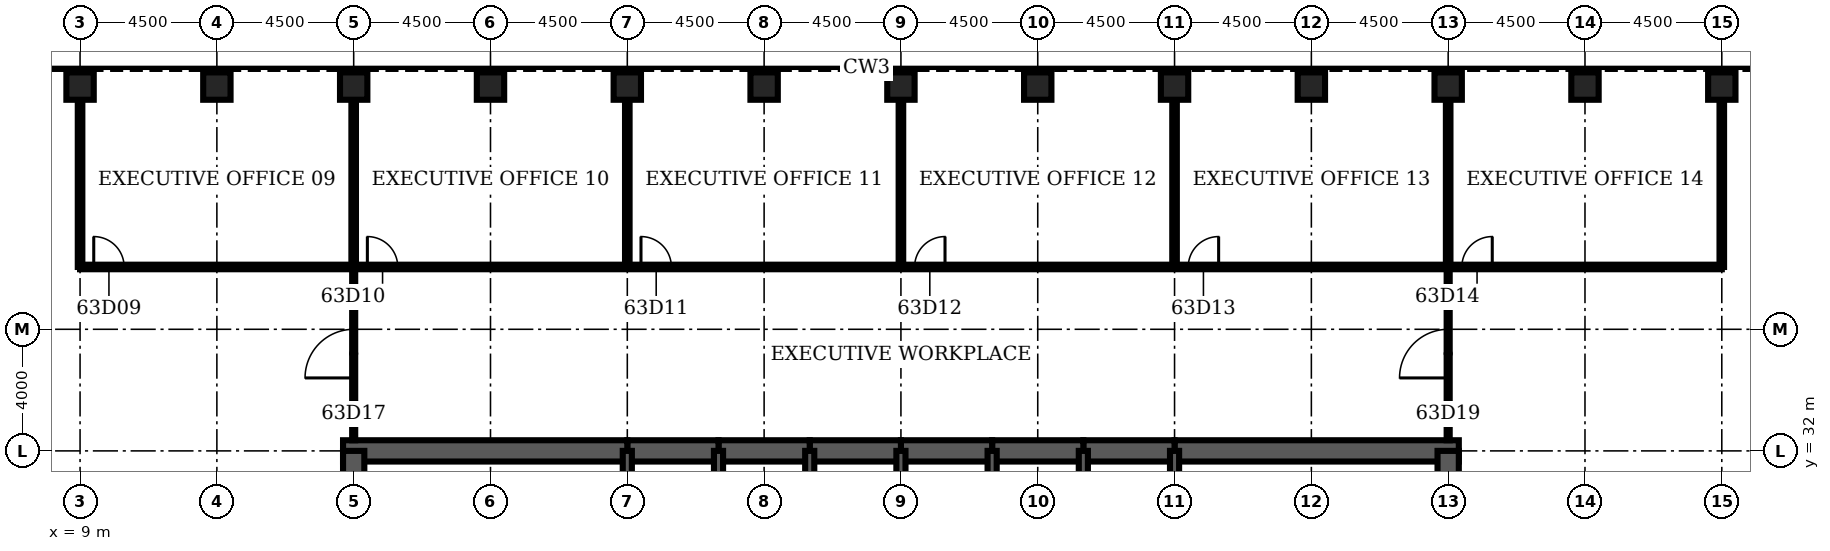
"""IFC4 building model, lengths in metres.
Left out: names, types, materials, properties, quantities, classifications, styles, units other than length and angle.
Written with IfcOpenShell. Run it as: python <this file> out.ifc"""

import sys

from ifc_helpers import new_model, si_unit, direction, frame, frame_2d, origin, origin_2d, place, context, subcontext, project, spatial, rectangle, hollow_rectangle, extrude, element, fill, save


model = new_model("IFC4")
c1 = context("Model", 3, precision=1e-05, world=origin(), true_north=direction((0.0, 1.0)))
c2 = subcontext(c1, "Body", "Model", "MODEL_VIEW")
j1 = project(units=[si_unit("LENGTHUNIT", "METRE"), si_unit("PLANEANGLEUNIT", "RADIAN")], contexts=[c1])
p1 = place(None, origin())
s1 = spatial("IfcSite", under=j1, at=p1, CompositionType="ELEMENT")
p2 = place(p1, origin())
s2 = spatial("IfcBuilding", under=s1, at=p2, CompositionType="ELEMENT")
p3 = place(p2, frame((0.0, 0.0, 279.5)))
s3 = spatial("IfcBuildingStorey", under=s2, at=p3, CompositionType="ELEMENT", Elevation=279.5)
for number, where, z_axis, x_axis in (
    (1, (63.0, 44.0, 0.0), (0.0, 0.0, 1.0), (0.0, 1.0, 0.0)),
    (2, (58.5, 44.0, 0.0), (0.0, 0.0, 1.0), (0.0, 1.0, 0.0)),
    (3, (54.0, 44.0, 0.0), (0.0, 0.0, 1.0), (0.0, 1.0, 0.0)),
    (4, (49.5, 44.0, 0.0), (0.0, 0.0, 1.0), (0.0, 1.0, 0.0)),
    (5, (45.0, 44.0, 0.0), (0.0, 0.0, 1.0), (0.0, 1.0, 0.0)),
    (6, (40.5, 44.0, 0.0), (0.0, 0.0, 1.0), (0.0, 1.0, 0.0)),
    (7, (36.0, 44.0, 0.0), (0.0, 0.0, 1.0), (0.0, 1.0, 0.0)),
    (8, (31.5, 44.0, 0.0), (0.0, 0.0, 1.0), (0.0, 1.0, 0.0)),
    (9, (27.0, 44.0, 0.0), (0.0, 0.0, 1.0), (0.0, 1.0, 0.0)),
    (10, (22.5, 44.0, 0.0), (0.0, 0.0, 1.0), (0.0, 1.0, 0.0)),
    (11, (18.0, 44.0, 0.0), (0.0, 0.0, 1.0), (0.0, 1.0, 0.0)),
    (12, (13.5, 44.0, 0.0), (0.0, 0.0, 1.0), (0.0, 1.0, 0.0)),
    (13, (9.0, 44.0, 0.0), (0.0, 0.0, 1.0), (0.0, 1.0, 0.0)),
):
    element("IfcColumn", number, at=place(p3, frame(where, z_axis=z_axis, x_axis=x_axis)), inside=s3, PredefinedType="COLUMN", context=c2, shape_type="SweptSolid", body=[
        extrude(hollow_rectangle(XDim=0.9, YDim=0.9, WallThickness=0.07, at=origin_2d()), origin(), (0.0, 0.0, 1.0), 4.2),
    ])
p4 = place(p3, frame((54.35, 32.0, 0.0), z_axis=(0.0, 0.0, 1.0), x_axis=(-1.0, 0.0, 0.0)))
e14 = element("IfcWall", 14, at=p4, inside=s3, PredefinedType="SHEAR", context=c2, shape_type="SweptSolid", body=[
    extrude(rectangle(XDim=9.35, YDim=0.7, at=frame_2d((4.675, 0.0))), origin(), (0.0, 0.0, 1.0), 4.2),
])
for number, where, z_axis, x_axis in (
    (15, (45.0, 32.0, 0.0), (0.0, 0.0, 1.0), (-1.0, 0.0, 0.0)),
    (16, (42.0, 32.0, 0.0), (0.0, 0.0, 1.0), (-1.0, 0.0, 0.0)),
    (17, (39.0, 32.0, 0.0), (0.0, 0.0, 1.0), (-1.0, 0.0, 0.0)),
    (18, (36.0, 32.0, 0.0), (0.0, 0.0, 1.0), (-1.0, 0.0, 0.0)),
    (19, (33.0, 32.0, 0.0), (0.0, 0.0, 1.0), (-1.0, 0.0, 0.0)),
    (20, (30.0, 32.0, 0.0), (0.0, 0.0, 1.0), (-1.0, 0.0, 0.0)),
):
    element("IfcWall", number, at=place(p3, frame(where, z_axis=z_axis, x_axis=x_axis)), inside=s3, PredefinedType="SHEAR", context=c2, shape_type="SweptSolid", body=[
        extrude(rectangle(XDim=3.0, YDim=0.7, at=frame_2d((1.5, 0.0))), origin(), (0.0, 0.0, 1.0), 4.2),
    ])
p5 = place(p3, frame((27.0, 32.0, 0.0), z_axis=(0.0, 0.0, 1.0), x_axis=(-1.0, 0.0, 0.0)))
e21 = element("IfcWall", 21, at=p5, inside=s3, PredefinedType="SHEAR", context=c2, shape_type="SweptSolid", body=[
    extrude(rectangle(XDim=9.35, YDim=0.7, at=frame_2d((4.675, 0.0))), origin(), (0.0, 0.0, 1.0), 4.2),
])
for number, where, z_axis, x_axis in (
    (22, (18.0, 32.0, 0.0), (0.0, 0.0, 1.0), (0.0, -1.0, 0.0)),
    (23, (54.0, 28.8, 0.0), (0.0, 0.0, 1.0), (0.0, 1.0, 0.0)),
):
    element("IfcWall", number, at=place(p3, frame(where, z_axis=z_axis, x_axis=x_axis)), inside=s3, PredefinedType="SHEAR", context=c2, shape_type="SweptSolid", body=[
        extrude(rectangle(XDim=3.2, YDim=0.7, at=frame_2d((1.6, 0.0))), origin(), (0.0, 0.0, 1.0), 4.2),
    ])
for number, where, z_axis, x_axis in (
    (24, (27.0, 28.8, 0.0), (0.0, 0.0, 1.0), (0.0, 1.0, 0.0)),
    (25, (30.0, 28.8, 0.0), (0.0, 0.0, 1.0), (0.0, 1.0, 0.0)),
    (26, (33.0, 28.8, 0.0), (0.0, 0.0, 1.0), (0.0, 1.0, 0.0)),
    (27, (36.0, 28.8, 0.0), (0.0, 0.0, 1.0), (0.0, 1.0, 0.0)),
    (28, (39.0, 28.8, 0.0), (0.0, 0.0, 1.0), (0.0, 1.0, 0.0)),
    (29, (42.0, 28.8, 0.0), (0.0, 0.0, 1.0), (0.0, 1.0, 0.0)),
    (30, (45.0, 28.8, 0.0), (0.0, 0.0, 1.0), (0.0, 1.0, 0.0)),
):
    element("IfcWall", number, at=place(p3, frame(where, z_axis=z_axis, x_axis=x_axis)), inside=s3, PredefinedType="SOLIDWALL", context=c2, shape_type="SweptSolid", body=[
        extrude(rectangle(XDim=3.2, YDim=0.3, at=frame_2d((1.6, 0.0))), origin(), (0.0, 0.0, 1.0), 4.2),
    ])
p6 = place(p3, frame((9.0, 38.05, 0.0), z_axis=(0.0, 0.0, 1.0), x_axis=(1.0, 0.0, 0.0)))
e31 = element("IfcWall", 31, at=p6, inside=s3, PredefinedType="PARTITIONING", context=c2, shape_type="SweptSolid", body=[
    extrude(rectangle(XDim=54.0, YDim=0.15, at=frame_2d((27.0, 0.0))), origin(), (0.0, 0.0, 1.0), 3.0),
])
p7 = place(p6, frame((0.45, 0.0, 0.0)))
e32 = element("IfcOpeningElement", 32, at=p7, cuts=e31, PredefinedType="OPENING", context=c2, shape_type="SweptSolid", body=[
    extrude(rectangle(XDim=1.0, YDim=2.1, at=frame_2d((0.5, 1.05))), frame((0.0, 0.085, 0.0), z_axis=(0.0, -1.0, 0.0), x_axis=(1.0, 0.0, 0.0)), (0.0, 0.0, 1.0), 0.17),
])
p8 = place(p6, frame((9.45, 0.0, 0.0)))
e33 = element("IfcOpeningElement", 33, at=p8, cuts=e31, PredefinedType="OPENING", context=c2, shape_type="SweptSolid", body=[
    extrude(rectangle(XDim=1.0, YDim=2.1, at=frame_2d((0.5, 1.05))), frame((0.0, 0.085, 0.0), z_axis=(0.0, -1.0, 0.0), x_axis=(1.0, 0.0, 0.0)), (0.0, 0.0, 1.0), 0.17),
])
p9 = place(p6, frame((18.45, 0.0, 0.0)))
e34 = element("IfcOpeningElement", 34, at=p9, cuts=e31, PredefinedType="OPENING", context=c2, shape_type="SweptSolid", body=[
    extrude(rectangle(XDim=1.0, YDim=2.1, at=frame_2d((0.5, 1.05))), frame((0.0, 0.085, 0.0), z_axis=(0.0, -1.0, 0.0), x_axis=(1.0, 0.0, 0.0)), (0.0, 0.0, 1.0), 0.17),
])
p10 = place(p6, frame((27.45, 0.0, 0.0)))
e35 = element("IfcOpeningElement", 35, at=p10, cuts=e31, PredefinedType="OPENING", context=c2, shape_type="SweptSolid", body=[
    extrude(rectangle(XDim=1.0, YDim=2.1, at=frame_2d((0.5, 1.05))), frame((0.0, 0.085, 0.0), z_axis=(0.0, -1.0, 0.0), x_axis=(1.0, 0.0, 0.0)), (0.0, 0.0, 1.0), 0.17),
])
p11 = place(p6, frame((36.45, 0.0, 0.0)))
e36 = element("IfcOpeningElement", 36, at=p11, cuts=e31, PredefinedType="OPENING", context=c2, shape_type="SweptSolid", body=[
    extrude(rectangle(XDim=1.0, YDim=2.1, at=frame_2d((0.5, 1.05))), frame((0.0, 0.085, 0.0), z_axis=(0.0, -1.0, 0.0), x_axis=(1.0, 0.0, 0.0)), (0.0, 0.0, 1.0), 0.17),
])
p12 = place(p6, frame((45.45, 0.0, 0.0)))
e37 = element("IfcOpeningElement", 37, at=p12, cuts=e31, PredefinedType="OPENING", context=c2, shape_type="SweptSolid", body=[
    extrude(rectangle(XDim=1.0, YDim=2.1, at=frame_2d((0.5, 1.05))), frame((0.0, 0.085, 0.0), z_axis=(0.0, -1.0, 0.0), x_axis=(1.0, 0.0, 0.0)), (0.0, 0.0, 1.0), 0.17),
])
p13 = place(p3, frame((9.0, 38.05, 0.0), z_axis=(0.0, 0.0, 1.0), x_axis=(0.0, 1.0, 0.0)))
e38 = element("IfcWall", 38, at=p13, inside=s3, PredefinedType="PARTITIONING", context=c2, shape_type="SweptSolid", body=[
    extrude(rectangle(XDim=5.5, YDim=0.15, at=frame_2d((2.75, 0.0))), origin(), (0.0, 0.0, 1.0), 3.0),
])
p14 = place(p3, frame((18.0, 32.35, 0.0), z_axis=(0.0, 0.0, 1.0), x_axis=(0.0, 1.0, 0.0)))
e39 = element("IfcWall", 39, at=p14, inside=s3, PredefinedType="PARTITIONING", context=c2, shape_type="SweptSolid", body=[
    extrude(rectangle(XDim=5.7, YDim=0.1, at=frame_2d((2.85, 0.0))), origin(), (0.0, 0.0, 1.0), 3.0),
])
p15 = place(p14, frame((2.05, 0.0, 0.0)))
e40 = element("IfcOpeningElement", 40, at=p15, cuts=e39, PredefinedType="OPENING", context=c2, shape_type="SweptSolid", body=[
    extrude(rectangle(XDim=1.6, YDim=2.1, at=frame_2d((0.8, 1.05))), frame((0.0, 0.06, 0.0), z_axis=(0.0, -1.0, 0.0), x_axis=(1.0, 0.0, 0.0)), (0.0, 0.0, 1.0), 0.12),
])
for number, where, z_axis, x_axis in (
    (41, (18.0, 38.05, 0.0), (0.0, 0.0, 1.0), (0.0, 1.0, 0.0)),
    (42, (27.0, 38.05, 0.0), (0.0, 0.0, 1.0), (0.0, 1.0, 0.0)),
    (43, (36.0, 38.05, 0.0), (0.0, 0.0, 1.0), (0.0, 1.0, 0.0)),
    (44, (45.0, 38.05, 0.0), (0.0, 0.0, 1.0), (0.0, 1.0, 0.0)),
):
    element("IfcWall", number, at=place(p3, frame(where, z_axis=z_axis, x_axis=x_axis)), inside=s3, PredefinedType="PARTITIONING", context=c2, shape_type="SweptSolid", body=[
        extrude(rectangle(XDim=5.5, YDim=0.15, at=frame_2d((2.75, 0.0))), origin(), (0.0, 0.0, 1.0), 3.0),
    ])
p16 = place(p3, frame((54.0, 32.35, 0.0), z_axis=(0.0, 0.0, 1.0), x_axis=(0.0, 1.0, 0.0)))
e45 = element("IfcWall", 45, at=p16, inside=s3, PredefinedType="PARTITIONING", context=c2, shape_type="SweptSolid", body=[
    extrude(rectangle(XDim=5.7, YDim=0.1, at=frame_2d((2.85, 0.0))), origin(), (0.0, 0.0, 1.0), 3.0),
])
p17 = place(p16, frame((2.05, 0.0, 0.0)))
e46 = element("IfcOpeningElement", 46, at=p17, cuts=e45, PredefinedType="OPENING", context=c2, shape_type="SweptSolid", body=[
    extrude(rectangle(XDim=1.6, YDim=2.1, at=frame_2d((0.8, 1.05))), frame((0.0, 0.06, 0.0), z_axis=(0.0, -1.0, 0.0), x_axis=(1.0, 0.0, 0.0)), (0.0, 0.0, 1.0), 0.12),
])
for number, where, z_axis, x_axis in (
    (47, (54.0, 38.05, 0.0), (0.0, 0.0, 1.0), (0.0, 1.0, 0.0)),
    (48, (63.0, 38.05, 0.0), (0.0, 0.0, 1.0), (0.0, 1.0, 0.0)),
):
    element("IfcWall", number, at=place(p3, frame(where, z_axis=z_axis, x_axis=x_axis)), inside=s3, PredefinedType="PARTITIONING", context=c2, shape_type="SweptSolid", body=[
        extrude(rectangle(XDim=5.5, YDim=0.15, at=frame_2d((2.75, 0.0))), origin(), (0.0, 0.0, 1.0), 3.0),
    ])
p18 = place(p7, origin())
e49 = element("IfcDoor", 49, at=p18, inside=s3, OperationType="SINGLE_SWING_LEFT", PredefinedType="DOOR", context=c2, shape_type="SweptSolid", body=[
    extrude(rectangle(XDim=1.0, YDim=2.1, at=frame_2d((0.5, 1.05))), frame((0.0, 0.025, 0.0), z_axis=(0.0, -1.0, 0.0), x_axis=(1.0, 0.0, 0.0)), (0.0, 0.0, 1.0), 0.05),
])
fill(e32, e49)
p19 = place(p8, origin())
e50 = element("IfcDoor", 50, at=p19, inside=s3, OperationType="SINGLE_SWING_LEFT", PredefinedType="DOOR", context=c2, shape_type="SweptSolid", body=[
    extrude(rectangle(XDim=1.0, YDim=2.1, at=frame_2d((0.5, 1.05))), frame((0.0, 0.025, 0.0), z_axis=(0.0, -1.0, 0.0), x_axis=(1.0, 0.0, 0.0)), (0.0, 0.0, 1.0), 0.05),
])
fill(e33, e50)
p20 = place(p9, origin())
e51 = element("IfcDoor", 51, at=p20, inside=s3, OperationType="SINGLE_SWING_LEFT", PredefinedType="DOOR", context=c2, shape_type="SweptSolid", body=[
    extrude(rectangle(XDim=1.0, YDim=2.1, at=frame_2d((0.5, 1.05))), frame((0.0, 0.025, 0.0), z_axis=(0.0, -1.0, 0.0), x_axis=(1.0, 0.0, 0.0)), (0.0, 0.0, 1.0), 0.05),
])
fill(e34, e51)
p21 = place(p10, origin())
e52 = element("IfcDoor", 52, at=p21, inside=s3, OperationType="SINGLE_SWING_RIGHT", PredefinedType="DOOR", context=c2, shape_type="SweptSolid", body=[
    extrude(rectangle(XDim=1.0, YDim=2.1, at=frame_2d((0.5, 1.05))), frame((0.0, 0.025, 0.0), z_axis=(0.0, -1.0, 0.0), x_axis=(1.0, 0.0, 0.0)), (0.0, 0.0, 1.0), 0.05),
])
fill(e35, e52)
p22 = place(p11, origin())
e53 = element("IfcDoor", 53, at=p22, inside=s3, OperationType="SINGLE_SWING_RIGHT", PredefinedType="DOOR", context=c2, shape_type="SweptSolid", body=[
    extrude(rectangle(XDim=1.0, YDim=2.1, at=frame_2d((0.5, 1.05))), frame((0.0, 0.025, 0.0), z_axis=(0.0, -1.0, 0.0), x_axis=(1.0, 0.0, 0.0)), (0.0, 0.0, 1.0), 0.05),
])
fill(e36, e53)
p23 = place(p12, origin())
e54 = element("IfcDoor", 54, at=p23, inside=s3, OperationType="SINGLE_SWING_RIGHT", PredefinedType="DOOR", context=c2, shape_type="SweptSolid", body=[
    extrude(rectangle(XDim=1.0, YDim=2.1, at=frame_2d((0.5, 1.05))), frame((0.0, 0.025, 0.0), z_axis=(0.0, -1.0, 0.0), x_axis=(1.0, 0.0, 0.0)), (0.0, 0.0, 1.0), 0.05),
])
fill(e37, e54)
p24 = place(p15, origin())
e55 = element("IfcDoor", 55, at=p24, inside=s3, OperationType="SINGLE_SWING_LEFT", PredefinedType="DOOR", context=c2, shape_type="SweptSolid", body=[
    extrude(rectangle(XDim=1.6, YDim=2.1, at=frame_2d((0.8, 1.05))), frame((0.0, 0.025, 0.0), z_axis=(0.0, -1.0, 0.0), x_axis=(1.0, 0.0, 0.0)), (0.0, 0.0, 1.0), 0.05),
])
fill(e40, e55)
p25 = place(p17, origin())
e56 = element("IfcDoor", 56, at=p25, inside=s3, OperationType="SINGLE_SWING_LEFT", PredefinedType="DOOR", context=c2, shape_type="SweptSolid", body=[
    extrude(rectangle(XDim=1.6, YDim=2.1, at=frame_2d((0.8, 1.05))), frame((0.0, 0.025, 0.0), z_axis=(0.0, -1.0, 0.0), x_axis=(1.0, 0.0, 0.0)), (0.0, 0.0, 1.0), 0.05),
])
fill(e46, e56)
save(model, sys.argv[1])
